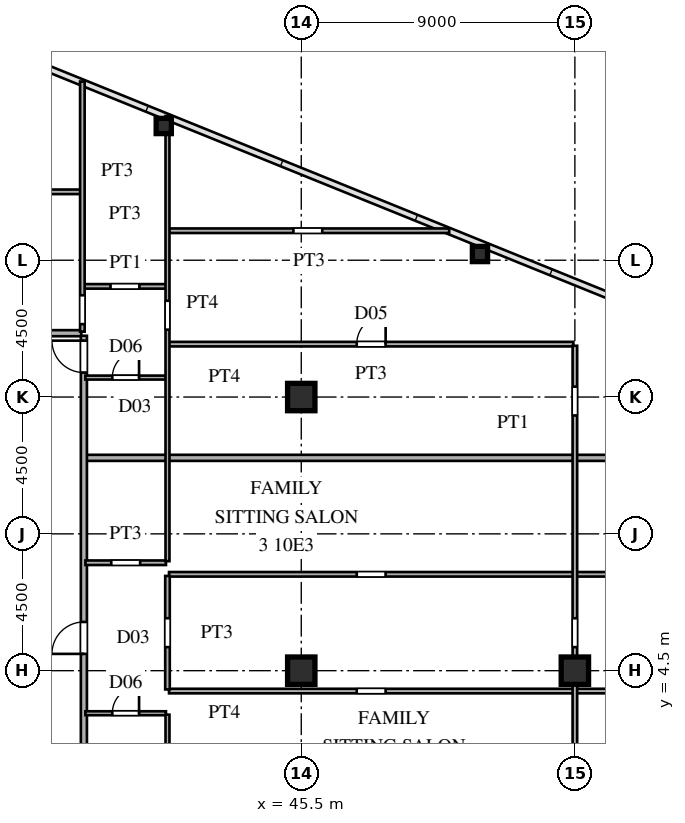
"""IFC4 building model, lengths in metres.
Left out: names, types, materials, properties, quantities, classifications, styles, units other than length and angle.
Written with IfcOpenShell. Run it as: python <this file> out.ifc"""

import sys

from ifc_helpers import new_model, si_unit, direction, frame, frame_2d, origin, origin_2d, place, context, subcontext, project, spatial, rectangle, hollow_rectangle, i_section, extrude, source, transform, mapped, element, fill, save


model = new_model("IFC4")
c1 = context("Model", 3, precision=1e-05, world=origin(), true_north=direction((0.0, 1.0)))
c2 = subcontext(c1, "Body", "Model", "MODEL_VIEW")
j1 = project(units=[si_unit("LENGTHUNIT", "METRE"), si_unit("PLANEANGLEUNIT", "RADIAN")], contexts=[c1])
p1 = place(None, origin())
s1 = spatial("IfcSite", under=j1, at=p1, CompositionType="ELEMENT")
p2 = place(p1, origin())
s2 = spatial("IfcBuilding", under=s1, at=p2, CompositionType="ELEMENT")
p3 = place(p2, frame((0.0, 0.0, 40.5)))
s3 = spatial("IfcBuildingStorey", under=s2, at=p3, CompositionType="ELEMENT", Elevation=40.5)
m1 = source(origin(), c2, "Body", "SweptSolid", [
    extrude(i_section(OverallWidth=0.9, OverallDepth=0.9, WebThickness=0.036, FlangeThickness=0.055, at=origin_2d()), origin(), (0.0, 0.0, 1.0), 3.6),
])
for number, where, z_axis, x_axis in (
    (1, (45.5, 4.5, 0.0), (0.0, 0.0, 1.0), (1.0, 0.0, 0.0)),
    (2, (45.5, 13.5, 0.0), (0.0, 0.0, 1.0), (1.0, 0.0, 0.0)),
    (3, (54.5, 4.5, 0.0), (0.0, 0.0, 1.0), (1.0, 0.0, 0.0)),
):
    element("IfcColumn", number, at=place(p3, frame(where, z_axis=z_axis, x_axis=x_axis)), inside=s3, PredefinedType="COLUMN", context=c2, shape_type="MappedRepresentation", body=[
        mapped(m1, transform((0.0, 0.0, 0.0), scale=1.0)),
    ])
m2 = source(origin(), c2, "Body", "SweptSolid", [
    extrude(hollow_rectangle(XDim=0.5, YDim=0.5, WallThickness=0.02, at=origin_2d()), origin(), (0.0, 0.0, 1.0), 3.6),
])
for number, where, z_axis, x_axis in (
    (4, (40.977, 22.414, 0.0), (0.0, 0.0, 1.0), (1.0, 0.0, 0.0)),
    (5, (51.378, 18.204, 0.0), (0.0, 0.0, 1.0), (1.0, 0.0, 0.0)),
):
    element("IfcColumn", number, at=place(p3, frame(where, z_axis=z_axis, x_axis=x_axis)), inside=s3, PredefinedType="COLUMN", context=c2, shape_type="MappedRepresentation", body=[
        mapped(m2, transform((0.0, 0.0, 0.0), scale=1.0)),
    ])
p4 = place(p3, frame((38.4, 3.1, 0.0), z_axis=(0.0, 0.0, 1.0), x_axis=(1.0, 0.0, 0.0)))
e6 = element("IfcWall", 6, at=p4, inside=s3, PredefinedType="PARTITIONING", context=c2, shape_type="SweptSolid", body=[
    extrude(rectangle(XDim=2.65, YDim=0.13, at=frame_2d((1.325, 0.0))), origin(), (0.0, 0.0, 1.0), 3.38),
])
p5 = place(p4, frame((0.885, 0.0, 0.0)))
e7 = element("IfcOpeningElement", 7, at=p5, cuts=e6, PredefinedType="OPENING", context=c2, shape_type="SweptSolid", body=[
    extrude(rectangle(XDim=0.88, YDim=2.1, at=frame_2d((0.44, 1.05))), frame((0.0, 0.075, 0.0), z_axis=(0.0, -1.0, 0.0), x_axis=(1.0, 0.0, 0.0)), (0.0, 0.0, 1.0), 0.15),
])
p6 = place(p3, frame((41.15, 3.83, 0.0), z_axis=(0.0, 0.0, 1.0), x_axis=(1.0, 0.0, 0.0)))
e8 = element("IfcWall", 8, at=p6, inside=s3, PredefinedType="PARTITIONING", context=c2, shape_type="SweptSolid", body=[
    extrude(rectangle(XDim=31.385, YDim=0.15, at=frame_2d((15.692, 0.0))), origin(), (0.0, 0.0, 1.0), 3.38),
])
p7 = place(p6, frame((6.175, 0.0, 0.0)))
e9 = element("IfcOpeningElement", 9, at=p7, cuts=e8, PredefinedType="OPENING", context=c2, shape_type="SweptSolid", body=[
    extrude(rectangle(XDim=0.95, YDim=2.15, at=frame_2d((0.475, 1.075))), frame((0.0, 0.085, 0.0), z_axis=(0.0, -1.0, 0.0), x_axis=(1.0, 0.0, 0.0)), (0.0, 0.0, 1.0), 0.17),
])
p8 = place(p6, frame((15.725, 0.0, 0.0)))
e10 = element("IfcOpeningElement", 10, at=p8, cuts=e8, PredefinedType="OPENING", context=c2, shape_type="SweptSolid", body=[
    extrude(rectangle(XDim=0.95, YDim=2.15, at=frame_2d((0.475, 1.075))), frame((0.0, 0.085, 0.0), z_axis=(0.0, -1.0, 0.0), x_axis=(1.0, 0.0, 0.0)), (0.0, 0.0, 1.0), 0.17),
])
p9 = place(p3, frame((41.15, 7.67, 0.0), z_axis=(0.0, 0.0, 1.0), x_axis=(1.0, 0.0, 0.0)))
e11 = element("IfcWall", 11, at=p9, inside=s3, PredefinedType="PARTITIONING", context=c2, shape_type="SweptSolid", body=[
    extrude(rectangle(XDim=31.385, YDim=0.15, at=frame_2d((15.692, 0.0))), origin(), (0.0, 0.0, 1.0), 3.38),
])
p10 = place(p9, frame((6.175, 0.0, 0.0)))
e12 = element("IfcOpeningElement", 12, at=p10, cuts=e11, PredefinedType="OPENING", context=c2, shape_type="SweptSolid", body=[
    extrude(rectangle(XDim=0.95, YDim=2.15, at=frame_2d((0.475, 1.075))), frame((0.0, 0.085, 0.0), z_axis=(0.0, -1.0, 0.0), x_axis=(1.0, 0.0, 0.0)), (0.0, 0.0, 1.0), 0.17),
])
p11 = place(p9, frame((15.725, 0.0, 0.0)))
e13 = element("IfcOpeningElement", 13, at=p11, cuts=e11, PredefinedType="OPENING", context=c2, shape_type="SweptSolid", body=[
    extrude(rectangle(XDim=0.95, YDim=2.15, at=frame_2d((0.475, 1.075))), frame((0.0, 0.085, 0.0), z_axis=(0.0, -1.0, 0.0), x_axis=(1.0, 0.0, 0.0)), (0.0, 0.0, 1.0), 0.17),
])
p12 = place(p3, frame((38.4, 8.05, 0.0), z_axis=(0.0, 0.0, 1.0), x_axis=(1.0, 0.0, 0.0)))
e14 = element("IfcWall", 14, at=p12, inside=s3, PredefinedType="PARTITIONING", context=c2, shape_type="SweptSolid", body=[
    extrude(rectangle(XDim=2.65, YDim=0.15, at=frame_2d((1.325, 0.0))), origin(), (0.0, 0.0, 1.0), 3.38),
])
p13 = place(p12, frame((0.85, 0.0, 0.0)))
e15 = element("IfcOpeningElement", 15, at=p13, cuts=e14, PredefinedType="OPENING", context=c2, shape_type="SweptSolid", body=[
    extrude(rectangle(XDim=0.95, YDim=2.15, at=frame_2d((0.475, 1.075))), frame((0.0, 0.085, 0.0), z_axis=(0.0, -1.0, 0.0), x_axis=(1.0, 0.0, 0.0)), (0.0, 0.0, 1.0), 0.17),
])
p14 = place(p3, frame((38.43, 11.5, 0.0), z_axis=(0.0, 0.0, 1.0), x_axis=(1.0, 0.0, 0.0)))
e16 = element("IfcWall", 16, at=p14, inside=s3, PredefinedType="PARTITIONING", context=c2, shape_type="SweptSolid", body=[
    extrude(rectangle(XDim=30.377, YDim=0.2, at=frame_2d((15.188, 0.0))), origin(), (0.0, 0.0, 1.0), 3.38),
])
p15 = place(p3, frame((38.4, 14.14, 0.0), z_axis=(0.0, 0.0, 1.0), x_axis=(1.0, 0.0, 0.0)))
e17 = element("IfcWall", 17, at=p15, inside=s3, PredefinedType="PARTITIONING", context=c2, shape_type="SweptSolid", body=[
    extrude(rectangle(XDim=2.65, YDim=0.13, at=frame_2d((1.325, 0.0))), origin(), (0.0, 0.0, 1.0), 3.38),
])
p16 = place(p15, frame((0.885, 0.0, 0.0)))
e18 = element("IfcOpeningElement", 18, at=p16, cuts=e17, PredefinedType="OPENING", context=c2, shape_type="SweptSolid", body=[
    extrude(rectangle(XDim=0.88, YDim=2.1, at=frame_2d((0.44, 1.05))), frame((0.0, 0.075, 0.0), z_axis=(0.0, -1.0, 0.0), x_axis=(1.0, 0.0, 0.0)), (0.0, 0.0, 1.0), 0.15),
])
p17 = place(p3, frame((41.15, 15.24, 0.0), z_axis=(0.0, 0.0, 1.0), x_axis=(1.0, 0.0, 0.0)))
e19 = element("IfcWall", 19, at=p17, inside=s3, PredefinedType="PARTITIONING", context=c2, shape_type="SweptSolid", body=[
    extrude(rectangle(XDim=13.3, YDim=0.15, at=frame_2d((6.65, 0.0))), origin(), (0.0, 0.0, 1.0), 3.38),
])
p18 = place(p17, frame((6.175, 0.0, 0.0)))
e20 = element("IfcOpeningElement", 20, at=p18, cuts=e19, PredefinedType="OPENING", context=c2, shape_type="SweptSolid", body=[
    extrude(rectangle(XDim=0.95, YDim=2.15, at=frame_2d((0.475, 1.075))), frame((0.0, 0.085, 0.0), z_axis=(0.0, -1.0, 0.0), x_axis=(1.0, 0.0, 0.0)), (0.0, 0.0, 1.0), 0.17),
])
p19 = place(p3, frame((36.585, 15.6, 0.0), z_axis=(0.0, 0.0, 1.0), x_axis=(1.0, 0.0, 0.0)))
e21 = element("IfcWall", 21, at=p19, inside=s3, PredefinedType="PARTITIONING", context=c2, shape_type="SweptSolid", body=[
    extrude(rectangle(XDim=1.68, YDim=0.2, at=frame_2d((0.84, 0.0))), origin(), (0.0, 0.0, 1.0), 3.38),
])
p20 = place(p3, frame((38.35, 17.14, 0.0), z_axis=(0.0, 0.0, 1.0), x_axis=(1.0, 0.0, 0.0)))
e22 = element("IfcWall", 22, at=p20, inside=s3, PredefinedType="PARTITIONING", context=c2, shape_type="SweptSolid", body=[
    extrude(rectangle(XDim=2.7, YDim=0.15, at=frame_2d((1.35, 0.0))), origin(), (0.0, 0.0, 1.0), 3.38),
])
p21 = place(p20, frame((0.875, 0.0, 0.0)))
e23 = element("IfcOpeningElement", 23, at=p21, cuts=e22, PredefinedType="OPENING", context=c2, shape_type="SweptSolid", body=[
    extrude(rectangle(XDim=0.95, YDim=2.15, at=frame_2d((0.475, 1.075))), frame((0.0, 0.085, 0.0), z_axis=(0.0, -1.0, 0.0), x_axis=(1.0, 0.0, 0.0)), (0.0, 0.0, 1.0), 0.17),
])
p22 = place(p3, frame((41.15, 18.97, 0.0), z_axis=(0.0, 0.0, 1.0), x_axis=(1.0, 0.0, 0.0)))
e24 = element("IfcWall", 24, at=p22, inside=s3, PredefinedType="PARTITIONING", context=c2, shape_type="SweptSolid", body=[
    extrude(rectangle(XDim=9.216, YDim=0.15, at=frame_2d((4.608, 0.0))), origin(), (0.0, 0.0, 1.0), 3.38),
])
p23 = place(p22, frame((4.091, 0.0, 0.0)))
e25 = element("IfcOpeningElement", 25, at=p23, cuts=e24, PredefinedType="OPENING", context=c2, shape_type="SweptSolid", body=[
    extrude(rectangle(XDim=0.95, YDim=2.15, at=frame_2d((0.475, 1.075))), frame((0.0, 0.085, 0.0), z_axis=(0.0, -1.0, 0.0), x_axis=(1.0, 0.0, 0.0)), (0.0, 0.0, 1.0), 0.17),
])
p24 = place(p3, frame((27.465, 20.25, 0.0), z_axis=(0.0, 0.0, 1.0), x_axis=(1.0, 0.0, 0.0)))
e26 = element("IfcWall", 26, at=p24, inside=s3, PredefinedType="PARTITIONING", context=c2, shape_type="SweptSolid", body=[
    extrude(rectangle(XDim=10.785, YDim=0.15, at=frame_2d((5.393, 0.0))), origin(), (0.0, 0.0, 1.0), 3.38),
])
p25 = place(p24, frame((4.96, 0.0, 0.0)))
e27 = element("IfcOpeningElement", 27, at=p25, cuts=e26, PredefinedType="OPENING", context=c2, shape_type="SweptSolid", body=[
    extrude(rectangle(XDim=0.95, YDim=2.15, at=frame_2d((0.475, 1.075))), frame((0.0, 0.085, 0.0), z_axis=(0.0, -1.0, 0.0), x_axis=(1.0, 0.0, 0.0)), (0.0, 0.0, 1.0), 0.17),
])
p26 = place(p3, frame((38.3, 15.65, 0.0), z_axis=(0.0, 0.0, 1.0), x_axis=(0.0, 1.0, 0.0)))
e28 = element("IfcWall", 28, at=p26, inside=s3, PredefinedType="PARTITIONING", context=c2, shape_type="SweptSolid", body=[
    extrude(rectangle(XDim=8.228, YDim=0.15, at=frame_2d((4.114, 0.0))), origin(), (0.0, 0.0, 1.0), 3.38),
])
p27 = place(p26, frame((0.248, 0.0, 0.0)))
e29 = element("IfcOpeningElement", 29, at=p27, cuts=e28, PredefinedType="OPENING", context=c2, shape_type="SweptSolid", body=[
    extrude(rectangle(XDim=0.95, YDim=2.15, at=frame_2d((0.475, 1.075))), frame((0.0, 0.085, 0.0), z_axis=(0.0, -1.0, 0.0), x_axis=(1.0, 0.0, 0.0)), (0.0, 0.0, 1.0), 0.17),
])
p28 = place(p3, frame((38.35, -15.515, 0.0), z_axis=(0.0, 0.0, 1.0), x_axis=(0.0, 1.0, 0.0)))
e30 = element("IfcWall", 30, at=p28, inside=s3, PredefinedType="PARTITIONING", context=c2, shape_type="SweptSolid", body=[
    extrude(rectangle(XDim=31.03, YDim=0.2, at=frame_2d((15.515, 0.0))), origin(), (0.0, 0.0, 1.0), 3.38),
])
p29 = place(p28, frame((0.16, 0.0, 0.0)))
e31 = element("IfcOpeningElement", 31, at=p29, cuts=e30, PredefinedType="OPENING", context=c2, shape_type="SweptSolid", body=[
    extrude(rectangle(XDim=1.05, YDim=2.25, at=frame_2d((0.525, 1.125))), frame((0.0, 0.11, 0.0), z_axis=(0.0, -1.0, 0.0), x_axis=(1.0, 0.0, 0.0)), (0.0, 0.0, 1.0), 0.22),
])
p30 = place(p28, frame((9.067, 0.0, 0.0)))
e32 = element("IfcOpeningElement", 32, at=p30, cuts=e30, PredefinedType="OPENING", context=c2, shape_type="SweptSolid", body=[
    extrude(rectangle(XDim=1.05, YDim=2.25, at=frame_2d((0.525, 1.125))), frame((0.0, 0.11, 0.0), z_axis=(0.0, -1.0, 0.0), x_axis=(1.0, 0.0, 0.0)), (0.0, 0.0, 1.0), 0.22),
])
p31 = place(p28, frame((20.567, 0.0, 0.0)))
e33 = element("IfcOpeningElement", 33, at=p31, cuts=e30, PredefinedType="OPENING", context=c2, shape_type="SweptSolid", body=[
    extrude(rectangle(XDim=1.05, YDim=2.25, at=frame_2d((0.525, 1.125))), frame((0.0, 0.11, 0.0), z_axis=(0.0, -1.0, 0.0), x_axis=(1.0, 0.0, 0.0)), (0.0, 0.0, 1.0), 0.22),
])
p32 = place(p28, frame((29.82, 0.0, 0.0)))
e34 = element("IfcOpeningElement", 34, at=p32, cuts=e30, PredefinedType="OPENING", context=c2, shape_type="SweptSolid", body=[
    extrude(rectangle(XDim=1.05, YDim=2.25, at=frame_2d((0.525, 1.125))), frame((0.0, 0.11, 0.0), z_axis=(0.0, -1.0, 0.0), x_axis=(1.0, 0.0, 0.0)), (0.0, 0.0, 1.0), 0.22),
])
p33 = place(p3, frame((41.1, -3.398, 0.0), z_axis=(0.0, 0.0, 1.0), x_axis=(0.0, 1.0, 0.0)))
e35 = element("IfcWall", 35, at=p33, inside=s3, PredefinedType="PARTITIONING", context=c2, shape_type="SweptSolid", body=[
    extrude(rectangle(XDim=6.451, YDim=0.13, at=frame_2d((3.226, 0.0))), origin(), (0.0, 0.0, 1.0), 3.38),
])
p34 = place(p3, frame((41.1, 3.883, 0.0), z_axis=(0.0, 0.0, 1.0), x_axis=(0.0, 1.0, 0.0)))
e36 = element("IfcWall", 36, at=p34, inside=s3, PredefinedType="PARTITIONING", context=c2, shape_type="SweptSolid", body=[
    extrude(rectangle(XDim=3.734, YDim=0.15, at=frame_2d((1.867, 0.0))), origin(), (0.0, 0.0, 1.0), 2.99),
])
p35 = place(p34, frame((1.392, 0.0, 0.0)))
e37 = element("IfcOpeningElement", 37, at=p35, cuts=e36, PredefinedType="OPENING", context=c2, shape_type="SweptSolid", body=[
    extrude(rectangle(XDim=0.95, YDim=2.15, at=frame_2d((0.475, 1.075))), frame((0.0, 0.085, 0.0), z_axis=(0.0, -1.0, 0.0), x_axis=(1.0, 0.0, 0.0)), (0.0, 0.0, 1.0), 0.17),
])
p36 = place(p3, frame((41.1, 8.102, 0.0), z_axis=(0.0, 0.0, 1.0), x_axis=(0.0, 1.0, 0.0)))
e38 = element("IfcWall", 38, at=p36, inside=s3, PredefinedType="PARTITIONING", context=c2, shape_type="SweptSolid", body=[
    extrude(rectangle(XDim=14.642, YDim=0.13, at=frame_2d((7.321, 0.0))), origin(), (0.0, 0.0, 1.0), 3.38),
])
p37 = place(p36, frame((7.614, 0.0, 0.0)))
e39 = element("IfcOpeningElement", 39, at=p37, cuts=e38, PredefinedType="OPENING", context=c2, shape_type="SweptSolid", body=[
    extrude(rectangle(XDim=0.95, YDim=2.15, at=frame_2d((0.475, 1.075))), frame((0.0, 0.075, 0.0), z_axis=(0.0, -1.0, 0.0), x_axis=(1.0, 0.0, 0.0)), (0.0, 0.0, 1.0), 0.15),
])
p38 = place(p3, frame((54.5, -15.186, 0.0), z_axis=(0.0, 0.0, 1.0), x_axis=(0.0, 1.0, 0.0)))
e40 = element("IfcWall", 40, at=p38, inside=s3, PredefinedType="PARTITIONING", context=c2, shape_type="SweptSolid", body=[
    extrude(rectangle(XDim=30.372, YDim=0.15, at=frame_2d((15.186, 0.0))), origin(), (0.0, 0.0, 1.0), 2.68),
])
p39 = place(p38, frame((1.343, 0.0, 0.0)))
e41 = element("IfcOpeningElement", 41, at=p39, cuts=e40, PredefinedType="OPENING", context=c2, shape_type="SweptSolid", body=[
    extrude(rectangle(XDim=0.95, YDim=2.15, at=frame_2d((0.475, 1.075))), frame((0.0, 0.085, 0.0), z_axis=(0.0, -1.0, 0.0), x_axis=(1.0, 0.0, 0.0)), (0.0, 0.0, 1.0), 0.17),
])
p40 = place(p38, frame((8.961, 0.0, 0.0)))
e42 = element("IfcOpeningElement", 42, at=p40, cuts=e40, PredefinedType="OPENING", context=c2, shape_type="SweptSolid", body=[
    extrude(rectangle(XDim=0.95, YDim=2.15, at=frame_2d((0.475, 1.075))), frame((0.0, 0.085, 0.0), z_axis=(0.0, -1.0, 0.0), x_axis=(1.0, 0.0, 0.0)), (0.0, 0.0, 1.0), 0.17),
])
p41 = place(p38, frame((20.461, 0.0, 0.0)))
e43 = element("IfcOpeningElement", 43, at=p41, cuts=e40, PredefinedType="OPENING", context=c2, shape_type="SweptSolid", body=[
    extrude(rectangle(XDim=0.95, YDim=2.15, at=frame_2d((0.475, 1.075))), frame((0.0, 0.085, 0.0), z_axis=(0.0, -1.0, 0.0), x_axis=(1.0, 0.0, 0.0)), (0.0, 0.0, 1.0), 0.17),
])
p42 = place(p38, frame((28.079, 0.0, 0.0)))
e44 = element("IfcOpeningElement", 44, at=p42, cuts=e40, PredefinedType="OPENING", context=c2, shape_type="SweptSolid", body=[
    extrude(rectangle(XDim=0.95, YDim=2.15, at=frame_2d((0.475, 1.075))), frame((0.0, 0.085, 0.0), z_axis=(0.0, -1.0, 0.0), x_axis=(1.0, 0.0, 0.0)), (0.0, 0.0, 1.0), 0.17),
])
m3 = source(origin(), c2, "Body", "SweptSolid", [
    extrude(rectangle(XDim=0.88, YDim=2.1, at=frame_2d((0.44, 1.05))), frame((0.0, 0.025, 0.0), z_axis=(0.0, -1.0, 0.0), x_axis=(1.0, 0.0, 0.0)), (0.0, 0.0, 1.0), 0.05),
])
p43 = place(p5, origin())
e45 = element("IfcDoor", 45, at=p43, inside=s3, OperationType="SINGLE_SWING_RIGHT", PredefinedType="DOOR", context=c2, shape_type="MappedRepresentation", body=[
    mapped(m3, transform((0.0, 0.0, 0.0), scale=1.0)),
])
fill(e7, e45)
p44 = place(p16, origin())
e46 = element("IfcDoor", 46, at=p44, inside=s3, OperationType="SINGLE_SWING_RIGHT", PredefinedType="DOOR", context=c2, shape_type="MappedRepresentation", body=[
    mapped(m3, transform((0.0, 0.0, 0.0), scale=1.0)),
])
fill(e18, e46)
m4 = source(origin(), c2, "Body", "SweptSolid", [
    extrude(rectangle(XDim=0.95, YDim=2.15, at=frame_2d((0.475, 1.075))), frame((0.0, 0.025, 0.0), z_axis=(0.0, -1.0, 0.0), x_axis=(1.0, 0.0, 0.0)), (0.0, 0.0, 1.0), 0.05),
])
p45 = place(p18, origin())
e47 = element("IfcDoor", 47, at=p45, inside=s3, OperationType="SINGLE_SWING_RIGHT", PredefinedType="DOOR", context=c2, shape_type="MappedRepresentation", body=[
    mapped(m4, transform((0.0, 0.0, 0.0), scale=1.0)),
])
fill(e20, e47)
m5 = source(origin(), c2, "Body", "SweptSolid", [
    extrude(rectangle(XDim=1.05, YDim=2.25, at=frame_2d((0.525, 1.125))), frame((0.0, 0.025, 0.0), z_axis=(0.0, -1.0, 0.0), x_axis=(1.0, 0.0, 0.0)), (0.0, 0.0, 1.0), 0.05),
])
p46 = place(p31, origin())
e48 = element("IfcDoor", 48, at=p46, inside=s3, OperationType="SINGLE_SWING_LEFT", PredefinedType="DOOR", context=c2, shape_type="MappedRepresentation", body=[
    mapped(m5, transform((0.0, 0.0, 0.0), scale=1.0)),
])
fill(e33, e48)
p47 = place(p32, origin())
e49 = element("IfcDoor", 49, at=p47, inside=s3, OperationType="SINGLE_SWING_RIGHT", PredefinedType="DOOR", context=c2, shape_type="MappedRepresentation", body=[
    mapped(m5, transform((0.0, 0.0, 0.0), scale=1.0)),
])
fill(e34, e49)
save(model, sys.argv[1])
